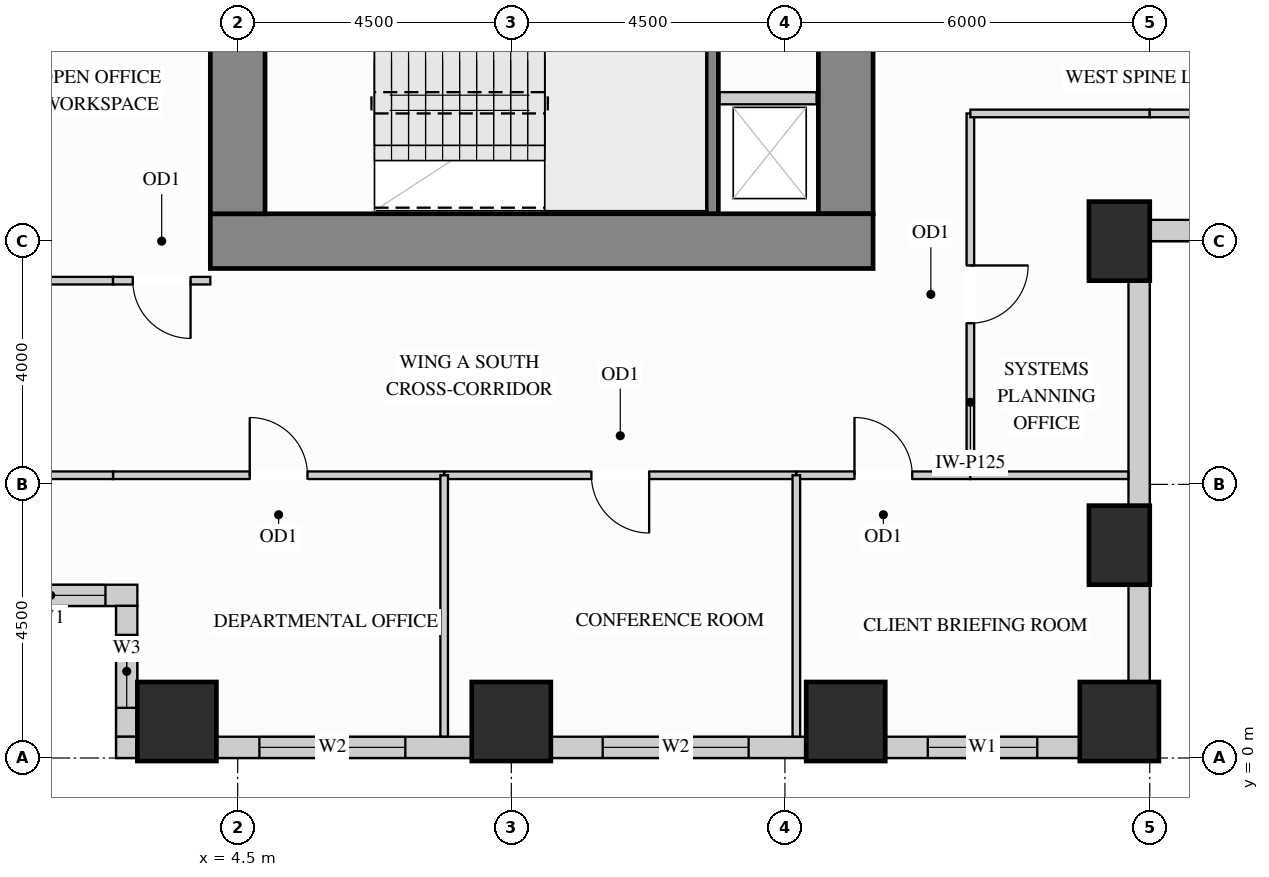
"""IFC4 building model, lengths in metres.
Left out: names, types, materials, properties, quantities, classifications, styles, units other than length and angle.
Written with IfcOpenShell. Run it as: python <this file> out.ifc"""

import sys

from ifc_helpers import new_model, si_unit, direction, frame, frame_2d, origin, origin_2d, place, context, subcontext, project, spatial, rectangle, extrude, source, transform, mapped, element, fill, save


model = new_model("IFC4")
c1 = context("Model", 3, precision=1e-05, world=origin(), true_north=direction((0.0, 1.0)))
c2 = subcontext(c1, "Body", "Model", "MODEL_VIEW")
j1 = project(units=[si_unit("LENGTHUNIT", "METRE"), si_unit("PLANEANGLEUNIT", "RADIAN")], contexts=[c1])
p1 = place(None, origin())
s1 = spatial("IfcSite", under=j1, at=p1, CompositionType="ELEMENT")
p2 = place(p1, origin())
s2 = spatial("IfcBuilding", under=s1, at=p2, CompositionType="ELEMENT")
p3 = place(p2, frame((0.0, 0.0, 22.5)))
s3 = spatial("IfcBuildingStorey", under=s2, at=p3, CompositionType="ELEMENT", Elevation=22.5)
m1 = source(origin(), c2, "Body", "SweptSolid", [
    extrude(rectangle(XDim=1.0, YDim=1.3, at=origin_2d()), origin(), (0.0, 0.0, 1.0), 3.38),
])
for number, where, z_axis, x_axis in (
    (1, (19.0, 3.5, 0.0), (0.0, 0.0, 1.0), (1.0, 0.0, 0.0)),
    (2, (19.0, 8.5, 0.0), (0.0, 0.0, 1.0), (1.0, 0.0, 0.0)),
):
    element("IfcColumn", number, at=place(p3, frame(where, z_axis=z_axis, x_axis=x_axis)), inside=s3, PredefinedType="COLUMN", context=c2, shape_type="MappedRepresentation", body=[
        mapped(m1, transform((0.0, 0.0, 0.0), x_axis=(1.0, 0.0, 0.0), y_axis=(0.0, 1.0, 0.0), z_axis=(0.0, 0.0, 1.0))),
    ])
m2 = source(origin(), c2, "Body", "SweptSolid", [
    extrude(rectangle(XDim=1.3, YDim=1.3, at=origin_2d()), origin(), (0.0, 0.0, 1.0), 3.38),
])
for number, where, z_axis, x_axis in (
    (3, (14.5, 0.6, 0.0), (0.0, 0.0, 1.0), (1.0, 0.0, 0.0)),
    (4, (19.0, 0.6, 0.0), (0.0, 0.0, 1.0), (1.0, 0.0, 0.0)),
    (5, (3.5, 0.6, 0.0), (0.0, 0.0, 1.0), (1.0, 0.0, 0.0)),
    (6, (9.0, 0.6, 0.0), (0.0, 0.0, 1.0), (1.0, 0.0, 0.0)),
):
    element("IfcColumn", number, at=place(p3, frame(where, z_axis=z_axis, x_axis=x_axis)), inside=s3, PredefinedType="COLUMN", context=c2, shape_type="MappedRepresentation", body=[
        mapped(m2, transform((0.0, 0.0, 0.0), x_axis=(1.0, 0.0, 0.0), y_axis=(0.0, 1.0, 0.0), z_axis=(0.0, 0.0, 1.0))),
    ])
m3 = source(origin(), c2, "Body", "SweptSolid", [
    extrude(rectangle(XDim=9.87, YDim=0.9, at=frame_2d((4.935, 0.0))), origin(), (0.0, 0.0, 1.0), 3.38),
])
p4 = place(p3, frame((14.5, 8.95, 0.0), z_axis=(0.0, 0.0, 1.0), x_axis=(0.0, 1.0, 0.0)))
e7 = element("IfcWall", 7, at=p4, inside=s3, PredefinedType="SHEAR", context=c2, shape_type="MappedRepresentation", body=[
    mapped(m3, transform((0.0, 0.0, 0.0), x_axis=(1.0, 0.0, 0.0), y_axis=(0.0, 1.0, 0.0), z_axis=(0.0, 0.0, 1.0))),
])
m4 = source(origin(), c2, "Body", "SweptSolid", [
    extrude(rectangle(XDim=10.9, YDim=0.9, at=frame_2d((5.45, 0.0))), origin(), (0.0, 0.0, 1.0), 3.38),
])
p5 = place(p3, frame((4.05, 8.5, 0.0), z_axis=(0.0, 0.0, 1.0), x_axis=(1.0, 0.0, 0.0)))
e8 = element("IfcWall", 8, at=p5, inside=s3, PredefinedType="SHEAR", context=c2, shape_type="MappedRepresentation", body=[
    mapped(m4, transform((0.0, 0.0, 0.0), x_axis=(1.0, 0.0, 0.0), y_axis=(0.0, 1.0, 0.0), z_axis=(0.0, 0.0, 1.0))),
])
m5 = source(origin(), c2, "Body", "SweptSolid", [
    extrude(rectangle(XDim=20.1, YDim=0.9, at=frame_2d((10.05, 0.0))), origin(), (0.0, 0.0, 1.0), 3.38),
])
p6 = place(p3, frame((4.5, 8.95, 0.0), z_axis=(0.0, 0.0, 1.0), x_axis=(0.0, 1.0, 0.0)))
e9 = element("IfcWall", 9, at=p6, inside=s3, PredefinedType="SHEAR", context=c2, shape_type="MappedRepresentation", body=[
    mapped(m5, transform((0.0, 0.0, 0.0), x_axis=(1.0, 0.0, 0.0), y_axis=(0.0, 1.0, 0.0), z_axis=(0.0, 0.0, 1.0))),
])
p7 = place(p3, frame((0.0, 2.675, 0.0), z_axis=(0.0, 0.0, 1.0), x_axis=(1.0, 0.0, 0.0)))
e10 = element("IfcWall", 10, at=p7, inside=s3, PredefinedType="SOLIDWALL", context=c2, shape_type="SweptSolid", body=[
    extrude(rectangle(XDim=2.85, YDim=0.35, at=frame_2d((1.425, 0.0))), origin(), (0.0, 0.0, 1.0), 3.365),
])
p8 = place(p7, frame((0.525, 0.0, 0.78)))
e11 = element("IfcOpeningElement", 11, at=p8, cuts=e10, PredefinedType="OPENING", context=c2, shape_type="SweptSolid", body=[
    extrude(rectangle(XDim=1.8, YDim=2.1, at=frame_2d((0.9, 1.05))), frame((0.0, 0.185, 0.0), z_axis=(0.0, -1.0, 0.0), x_axis=(1.0, 0.0, 0.0)), (0.0, 0.0, 1.0), 0.37),
])
p9 = place(p3, frame((2.675, 2.502, 0.0), z_axis=(0.0, 0.0, 1.0), x_axis=(0.0, -1.0, 0.0)))
e12 = element("IfcWall", 12, at=p9, inside=s3, PredefinedType="SOLIDWALL", context=c2, shape_type="SweptSolid", body=[
    extrude(rectangle(XDim=2.154, YDim=0.35, at=frame_2d((1.077, 0.0))), origin(), (0.0, 0.0, 1.0), 3.365),
])
p10 = place(p9, frame((0.477, 0.0, 0.78)))
e13 = element("IfcOpeningElement", 13, at=p10, cuts=e12, PredefinedType="OPENING", context=c2, shape_type="SweptSolid", body=[
    extrude(rectangle(XDim=1.2, YDim=2.1, at=frame_2d((0.6, 1.05))), frame((0.0, 0.185, 0.0), z_axis=(0.0, -1.0, 0.0), x_axis=(1.0, 0.0, 0.0)), (0.0, 0.0, 1.0), 0.37),
])
m6 = source(origin(), c2, "Body", "SweptSolid", [
    extrude(rectangle(XDim=0.352, YDim=0.35, at=frame_2d((0.176, 0.0))), origin(), (0.0, 0.0, 1.0), 3.365),
])
p11 = place(p3, frame((2.5, 0.175, 0.0), z_axis=(0.0, 0.0, 1.0), x_axis=(1.0, 0.0, 0.0)))
e14 = element("IfcWall", 14, at=p11, inside=s3, PredefinedType="SOLIDWALL", context=c2, shape_type="MappedRepresentation", body=[
    mapped(m6, transform((0.0, 0.0, 0.0), x_axis=(1.0, 0.0, 0.0), y_axis=(0.0, 1.0, 0.0), z_axis=(0.0, 0.0, 1.0))),
])
p12 = place(p3, frame((4.148, 0.175, 0.0), z_axis=(0.0, 0.0, 1.0), x_axis=(1.0, 0.0, 0.0)))
e15 = element("IfcWall", 15, at=p12, inside=s3, PredefinedType="SOLIDWALL", context=c2, shape_type="SweptSolid", body=[
    extrude(rectangle(XDim=4.204, YDim=0.35, at=frame_2d((2.102, 0.0))), origin(), (0.0, 0.0, 1.0), 2.51),
])
p13 = place(p12, frame((0.709, 0.0, 0.78)))
e16 = element("IfcOpeningElement", 16, at=p13, cuts=e15, PredefinedType="OPENING", context=c2, shape_type="SweptSolid", body=[
    extrude(rectangle(XDim=2.4, YDim=1.55, at=frame_2d((1.2, 0.775))), frame((0.0, 0.185, 0.0), z_axis=(0.0, -1.0, 0.0), x_axis=(1.0, 0.0, 0.0)), (0.0, 0.0, 1.0), 0.37),
])
p14 = place(p3, frame((9.648, 0.175, 0.0), z_axis=(0.0, 0.0, 1.0), x_axis=(1.0, 0.0, 0.0)))
e17 = element("IfcWall", 17, at=p14, inside=s3, PredefinedType="SOLIDWALL", context=c2, shape_type="SweptSolid", body=[
    extrude(rectangle(XDim=4.204, YDim=0.35, at=frame_2d((2.102, 0.0))), origin(), (0.0, 0.0, 1.0), 2.51),
])
p15 = place(p14, frame((0.855, 0.0, 0.78)))
e18 = element("IfcOpeningElement", 18, at=p15, cuts=e17, PredefinedType="OPENING", context=c2, shape_type="SweptSolid", body=[
    extrude(rectangle(XDim=2.4, YDim=1.55, at=frame_2d((1.2, 0.775))), frame((0.0, 0.185, 0.0), z_axis=(0.0, -1.0, 0.0), x_axis=(1.0, 0.0, 0.0)), (0.0, 0.0, 1.0), 0.37),
])
p16 = place(p3, frame((15.148, 0.175, 0.0), z_axis=(0.0, 0.0, 1.0), x_axis=(1.0, 0.0, 0.0)))
e19 = element("IfcWall", 19, at=p16, inside=s3, PredefinedType="SOLIDWALL", context=c2, shape_type="SweptSolid", body=[
    extrude(rectangle(XDim=3.204, YDim=0.35, at=frame_2d((1.602, 0.0))), origin(), (0.0, 0.0, 1.0), 2.51),
])
p17 = place(p16, frame((0.702, 0.0, 0.78)))
e20 = element("IfcOpeningElement", 20, at=p17, cuts=e19, PredefinedType="OPENING", context=c2, shape_type="SweptSolid", body=[
    extrude(rectangle(XDim=1.8, YDim=1.55, at=frame_2d((0.9, 0.775))), frame((0.0, 0.185, 0.0), z_axis=(0.0, -1.0, 0.0), x_axis=(1.0, 0.0, 0.0)), (0.0, 0.0, 1.0), 0.37),
])
m7 = source(origin(), c2, "Body", "SweptSolid", [
    extrude(rectangle(XDim=1.604, YDim=0.35, at=frame_2d((0.802, 0.0))), origin(), (0.0, 0.0, 1.0), 2.51),
])
p18 = place(p3, frame((19.325, 1.248, 0.0), z_axis=(0.0, 0.0, 1.0), x_axis=(0.0, 1.0, 0.0)))
e21 = element("IfcWall", 21, at=p18, inside=s3, PredefinedType="SOLIDWALL", context=c2, shape_type="MappedRepresentation", body=[
    mapped(m7, transform((0.0, 0.0, 0.0), x_axis=(1.0, 0.0, 0.0), y_axis=(0.0, 1.0, 0.0), z_axis=(0.0, 0.0, 1.0))),
])
m8 = source(origin(), c2, "Body", "SweptSolid", [
    extrude(rectangle(XDim=3.704, YDim=0.35, at=frame_2d((1.852, 0.0))), origin(), (0.0, 0.0, 1.0), 2.51),
])
p19 = place(p3, frame((19.325, 4.148, 0.0), z_axis=(0.0, 0.0, 1.0), x_axis=(0.0, 1.0, 0.0)))
e22 = element("IfcWall", 22, at=p19, inside=s3, PredefinedType="SOLIDWALL", context=c2, shape_type="MappedRepresentation", body=[
    mapped(m8, transform((0.0, 0.0, 0.0), x_axis=(1.0, 0.0, 0.0), y_axis=(0.0, 1.0, 0.0), z_axis=(0.0, 0.0, 1.0))),
])
p20 = place(p3, frame((19.498, 8.675, 0.0), z_axis=(0.0, 0.0, 1.0), x_axis=(1.0, 0.0, 0.0)))
e23 = element("IfcWall", 23, at=p20, inside=s3, PredefinedType="SOLIDWALL", context=c2, shape_type="SweptSolid", body=[
    extrude(rectangle(XDim=3.404, YDim=0.35, at=frame_2d((1.702, 0.0))), origin(), (0.0, 0.0, 1.0), 3.365),
])
p21 = place(p20, frame((0.952, 0.0, 0.78)))
e24 = element("IfcOpeningElement", 24, at=p21, cuts=e23, PredefinedType="OPENING", context=c2, shape_type="SweptSolid", body=[
    extrude(rectangle(XDim=1.5, YDim=2.0, at=frame_2d((0.75, 1.0))), frame((0.0, 0.185, 0.0), z_axis=(0.0, -1.0, 0.0), x_axis=(1.0, 0.0, 0.0)), (0.0, 0.0, 1.0), 0.37),
])
p22 = place(p3, frame((16.55, 4.65, 0.0), z_axis=(0.0, 0.0, 1.0), x_axis=(0.0, 1.0, 0.0)))
e25 = element("IfcWall", 25, at=p22, inside=s3, PredefinedType="PARTITIONING", context=c2, shape_type="SweptSolid", body=[
    extrude(rectangle(XDim=5.95, YDim=0.125, at=frame_2d((2.975, 0.0))), origin(), (0.0, 0.0, 1.0), 3.365),
])
p23 = place(p22, frame((2.5, 0.0, 0.0)))
e26 = element("IfcOpeningElement", 26, at=p23, cuts=e25, PredefinedType="OPENING", context=c2, shape_type="SweptSolid", body=[
    extrude(rectangle(XDim=0.95, YDim=2.15, at=frame_2d((0.475, 1.075))), frame((0.0, 0.073, 0.0), z_axis=(0.0, -1.0, 0.0), x_axis=(1.0, 0.0, 0.0)), (0.0, 0.0, 1.0), 0.145),
])
m9 = source(origin(), c2, "Body", "SweptSolid", [
    extrude(rectangle(XDim=1.19, YDim=0.125, at=frame_2d((0.595, 0.0))), origin(), (0.0, 0.0, 1.0), 3.365),
])
p24 = place(p3, frame((1.26, 7.85, 0.0), z_axis=(0.0, 0.0, 1.0), x_axis=(1.0, 0.0, 0.0)))
e27 = element("IfcWall", 27, at=p24, inside=s3, PredefinedType="PARTITIONING", context=c2, shape_type="MappedRepresentation", body=[
    mapped(m9, transform((0.0, 0.0, 0.0), x_axis=(1.0, 0.0, 0.0), y_axis=(0.0, 1.0, 0.0), z_axis=(0.0, 0.0, 1.0))),
])
p25 = place(p3, frame((2.45, 7.85, 0.0), z_axis=(0.0, 0.0, 1.0), x_axis=(1.0, 0.0, 0.0)))
e28 = element("IfcWall", 28, at=p25, inside=s3, PredefinedType="PARTITIONING", context=c2, shape_type="SweptSolid", body=[
    extrude(rectangle(XDim=1.6, YDim=0.125, at=frame_2d((0.8, 0.0))), origin(), (0.0, 0.0, 1.0), 3.365),
])
p26 = place(p25, frame((0.325, 0.0, 0.0)))
e29 = element("IfcOpeningElement", 29, at=p26, cuts=e28, PredefinedType="OPENING", context=c2, shape_type="SweptSolid", body=[
    extrude(rectangle(XDim=0.95, YDim=2.15, at=frame_2d((0.475, 1.075))), frame((0.0, 0.073, 0.0), z_axis=(0.0, -1.0, 0.0), x_axis=(1.0, 0.0, 0.0)), (0.0, 0.0, 1.0), 0.145),
])
m10 = source(origin(), c2, "Body", "SweptSolid", [
    extrude(rectangle(XDim=2.95, YDim=0.125, at=frame_2d((1.475, 0.0))), origin(), (0.0, 0.0, 1.0), 3.365),
])
p27 = place(p3, frame((16.55, 10.6, 0.0), z_axis=(0.0, 0.0, 1.0), x_axis=(1.0, 0.0, 0.0)))
e30 = element("IfcWall", 30, at=p27, inside=s3, PredefinedType="PARTITIONING", context=c2, shape_type="MappedRepresentation", body=[
    mapped(m10, transform((0.0, 0.0, 0.0), x_axis=(1.0, 0.0, 0.0), y_axis=(0.0, 1.0, 0.0), z_axis=(0.0, 0.0, 1.0))),
])
p28 = place(p3, frame((19.5, 10.6, 0.0), z_axis=(0.0, 0.0, 1.0), x_axis=(1.0, 0.0, 0.0)))
e31 = element("IfcWall", 31, at=p28, inside=s3, PredefinedType="PARTITIONING", context=c2, shape_type="SweptSolid", body=[
    extrude(rectangle(XDim=14.9, YDim=0.125, at=frame_2d((7.45, 0.0))), origin(), (0.0, 0.0, 1.0), 3.365),
])
p29 = place(p28, frame((6.975, 0.0, 0.0)))
e32 = element("IfcOpeningElement", 32, at=p29, cuts=e31, PredefinedType="OPENING", context=c2, shape_type="SweptSolid", body=[
    extrude(rectangle(XDim=0.95, YDim=2.15, at=frame_2d((0.475, 1.075))), frame((0.0, 0.073, 0.0), z_axis=(0.0, -1.0, 0.0), x_axis=(1.0, 0.0, 0.0)), (0.0, 0.0, 1.0), 0.145),
])
p30 = place(p3, frame((2.45, 4.65, 0.0), z_axis=(0.0, 0.0, 1.0), x_axis=(1.0, 0.0, 0.0)))
e33 = element("IfcWall", 33, at=p30, inside=s3, PredefinedType="PARTITIONING", context=c2, shape_type="SweptSolid", body=[
    extrude(rectangle(XDim=5.446, YDim=0.125, at=frame_2d((2.723, 0.0))), origin(), (0.0, 0.0, 1.0), 2.828),
])
p31 = place(p30, frame((2.248, 0.0, 0.0)))
e34 = element("IfcOpeningElement", 34, at=p31, cuts=e33, PredefinedType="OPENING", context=c2, shape_type="SweptSolid", body=[
    extrude(rectangle(XDim=0.95, YDim=2.15, at=frame_2d((0.475, 1.075))), frame((0.0, 0.073, 0.0), z_axis=(0.0, -1.0, 0.0), x_axis=(1.0, 0.0, 0.0)), (0.0, 0.0, 1.0), 0.145),
])
p32 = place(p3, frame((7.896, 4.65, 0.0), z_axis=(0.0, 0.0, 1.0), x_axis=(1.0, 0.0, 0.0)))
e35 = element("IfcWall", 35, at=p32, inside=s3, PredefinedType="PARTITIONING", context=c2, shape_type="SweptSolid", body=[
    extrude(rectangle(XDim=5.792, YDim=0.125, at=frame_2d((2.896, 0.0))), origin(), (0.0, 0.0, 1.0), 2.828),
])
p33 = place(p32, frame((2.421, 0.0, 0.0)))
e36 = element("IfcOpeningElement", 36, at=p33, cuts=e35, PredefinedType="OPENING", context=c2, shape_type="SweptSolid", body=[
    extrude(rectangle(XDim=0.95, YDim=2.15, at=frame_2d((0.475, 1.075))), frame((0.0, 0.073, 0.0), z_axis=(0.0, -1.0, 0.0), x_axis=(1.0, 0.0, 0.0)), (0.0, 0.0, 1.0), 0.145),
])
p34 = place(p3, frame((13.688, 4.65, 0.0), z_axis=(0.0, 0.0, 1.0), x_axis=(1.0, 0.0, 0.0)))
e37 = element("IfcWall", 37, at=p34, inside=s3, PredefinedType="PARTITIONING", context=c2, shape_type="SweptSolid", body=[
    extrude(rectangle(XDim=2.862, YDim=0.125, at=frame_2d((1.431, 0.0))), origin(), (0.0, 0.0, 1.0), 2.828),
])
p35 = place(p34, frame((0.956, 0.0, 0.0)))
e38 = element("IfcOpeningElement", 38, at=p35, cuts=e37, PredefinedType="OPENING", context=c2, shape_type="SweptSolid", body=[
    extrude(rectangle(XDim=0.95, YDim=2.15, at=frame_2d((0.475, 1.075))), frame((0.0, 0.073, 0.0), z_axis=(0.0, -1.0, 0.0), x_axis=(1.0, 0.0, 0.0)), (0.0, 0.0, 1.0), 0.145),
])
m11 = source(origin(), c2, "Body", "SweptSolid", [
    extrude(rectangle(XDim=2.098, YDim=0.125, at=frame_2d((1.049, 0.0))), origin(), (0.0, 0.0, 1.0), 2.828),
])
p36 = place(p3, frame((0.352, 4.65, 0.0), z_axis=(0.0, 0.0, 1.0), x_axis=(1.0, 0.0, 0.0)))
e39 = element("IfcWall", 39, at=p36, inside=s3, PredefinedType="PARTITIONING", context=c2, shape_type="MappedRepresentation", body=[
    mapped(m11, transform((0.0, 0.0, 0.0), x_axis=(1.0, 0.0, 0.0), y_axis=(0.0, 1.0, 0.0), z_axis=(0.0, 0.0, 1.0))),
])
m12 = source(origin(), c2, "Body", "SweptSolid", [
    extrude(rectangle(XDim=2.598, YDim=0.125, at=frame_2d((1.299, 0.0))), origin(), (0.0, 0.0, 1.0), 2.828),
])
p37 = place(p3, frame((16.55, 4.65, 0.0), z_axis=(0.0, 0.0, 1.0), x_axis=(1.0, 0.0, 0.0)))
e40 = element("IfcWall", 40, at=p37, inside=s3, PredefinedType="PARTITIONING", context=c2, shape_type="MappedRepresentation", body=[
    mapped(m12, transform((0.0, 0.0, 0.0), x_axis=(1.0, 0.0, 0.0), y_axis=(0.0, 1.0, 0.0), z_axis=(0.0, 0.0, 1.0))),
])
m13 = source(origin(), c2, "Body", "SweptSolid", [
    extrude(rectangle(XDim=4.298, YDim=0.125, at=frame_2d((2.149, 0.0))), origin(), (0.0, 0.0, 1.0), 3.365),
])
for number, where, z_axis, x_axis in (
    (41, (7.896, 0.352, 0.0), (0.0, 0.0, 1.0), (0.0, 1.0, 0.0)),
    (42, (13.688, 0.352, 0.0), (0.0, 0.0, 1.0), (0.0, 1.0, 0.0)),
):
    element("IfcWall", number, at=place(p3, frame(where, z_axis=z_axis, x_axis=x_axis)), inside=s3, PredefinedType="PARTITIONING", context=c2, shape_type="MappedRepresentation", body=[
        mapped(m13, transform((0.0, 0.0, 0.0), x_axis=(1.0, 0.0, 0.0), y_axis=(0.0, 1.0, 0.0), z_axis=(0.0, 0.0, 1.0))),
    ])
m14 = source(origin(), c2, "Body", "SweptSolid", [
    extrude(rectangle(XDim=1.6, YDim=0.2, at=frame_2d((0.8, 0.0))), origin(), (0.0, 0.0, 1.0), 3.365),
])
p38 = place(p3, frame((12.42, 10.85, 0.0), z_axis=(0.0, 0.0, 1.0), x_axis=(1.0, 0.0, 0.0)))
e43 = element("IfcWall", 43, at=p38, inside=s3, PredefinedType="PARTITIONING", context=c2, shape_type="MappedRepresentation", body=[
    mapped(m14, transform((0.0, 0.0, 0.0), x_axis=(1.0, 0.0, 0.0), y_axis=(0.0, 1.0, 0.0), z_axis=(0.0, 0.0, 1.0))),
])
m15 = source(origin(), c2, "Body", "SweptSolid", [
    extrude(rectangle(XDim=3.603, YDim=0.2, at=frame_2d((1.802, 0.0))), origin(), (0.0, 0.0, 1.0), 3.38),
])
p39 = place(p3, frame((12.305, 8.952, 0.0), z_axis=(0.0, 0.0, 1.0), x_axis=(0.0, 1.0, 0.0)))
e44 = element("IfcWall", 44, at=p39, inside=s3, PredefinedType="SHEAR", context=c2, shape_type="MappedRepresentation", body=[
    mapped(m15, transform((0.0, 0.0, 0.0), x_axis=(1.0, 0.0, 0.0), y_axis=(0.0, 1.0, 0.0), z_axis=(0.0, 0.0, 1.0))),
])
m16 = source(origin(), c2, "Body", "SweptSolid", [
    extrude(rectangle(XDim=0.95, YDim=2.15, at=frame_2d((0.475, 1.075))), frame((0.0, 0.025, 0.0), z_axis=(0.0, -1.0, 0.0), x_axis=(1.0, 0.0, 0.0)), (0.0, 0.0, 1.0), 0.05),
])
p40 = place(p23, origin())
e45 = element("IfcDoor", 45, at=p40, inside=s3, OperationType="SINGLE_SWING_RIGHT", PredefinedType="DOOR", context=c2, shape_type="MappedRepresentation", body=[
    mapped(m16, transform((0.0, 0.0, 0.0), x_axis=(1.0, 0.0, 0.0), y_axis=(0.0, 1.0, 0.0), z_axis=(0.0, 0.0, 1.0))),
])
fill(e26, e45)
p41 = place(p31, origin())
e46 = element("IfcDoor", 46, at=p41, inside=s3, OperationType="SINGLE_SWING_LEFT", PredefinedType="DOOR", context=c2, shape_type="MappedRepresentation", body=[
    mapped(m16, transform((0.0, 0.0, 0.0), x_axis=(1.0, 0.0, 0.0), y_axis=(0.0, 1.0, 0.0), z_axis=(0.0, 0.0, 1.0))),
])
fill(e34, e46)
p42 = place(p33, origin())
e47 = element("IfcDoor", 47, at=p42, inside=s3, OperationType="SINGLE_SWING_RIGHT", PredefinedType="DOOR", context=c2, shape_type="MappedRepresentation", body=[
    mapped(m16, transform((0.0, 0.0, 0.0), x_axis=(1.0, 0.0, 0.0), y_axis=(0.0, 1.0, 0.0), z_axis=(0.0, 0.0, 1.0))),
])
fill(e36, e47)
p43 = place(p35, origin())
e48 = element("IfcDoor", 48, at=p43, inside=s3, OperationType="SINGLE_SWING_LEFT", PredefinedType="DOOR", context=c2, shape_type="MappedRepresentation", body=[
    mapped(m16, transform((0.0, 0.0, 0.0), x_axis=(1.0, 0.0, 0.0), y_axis=(0.0, 1.0, 0.0), z_axis=(0.0, 0.0, 1.0))),
])
fill(e38, e48)
p44 = place(p26, origin())
e49 = element("IfcDoor", 49, at=p44, inside=s3, OperationType="SINGLE_SWING_RIGHT", PredefinedType="DOOR", context=c2, shape_type="MappedRepresentation", body=[
    mapped(m16, transform((0.0, 0.0, 0.0), x_axis=(1.0, 0.0, 0.0), y_axis=(0.0, 1.0, 0.0), z_axis=(0.0, 0.0, 1.0))),
])
fill(e29, e49)
m17 = source(origin(), c2, "Body", "SweptSolid", [
    extrude(rectangle(XDim=1.8, YDim=2.1, at=frame_2d((0.9, 1.05))), frame((0.0, 0.03, 0.0), z_axis=(0.0, -1.0, 0.0), x_axis=(1.0, 0.0, 0.0)), (0.0, 0.0, 1.0), 0.06),
])
p45 = place(p8, origin())
e50 = element("IfcWindow", 50, at=p45, inside=s3, PartitioningType="SINGLE_PANEL", PredefinedType="WINDOW", context=c2, shape_type="MappedRepresentation", body=[
    mapped(m17, transform((0.0, 0.0, 0.0), x_axis=(1.0, 0.0, 0.0), y_axis=(0.0, 1.0, 0.0), z_axis=(0.0, 0.0, 1.0))),
])
fill(e11, e50)
m18 = source(origin(), c2, "Body", "SweptSolid", [
    extrude(rectangle(XDim=1.8, YDim=1.55, at=frame_2d((0.9, 0.775))), frame((0.0, 0.03, 0.0), z_axis=(0.0, -1.0, 0.0), x_axis=(1.0, 0.0, 0.0)), (0.0, 0.0, 1.0), 0.06),
])
p46 = place(p17, origin())
e51 = element("IfcWindow", 51, at=p46, inside=s3, PartitioningType="SINGLE_PANEL", PredefinedType="WINDOW", context=c2, shape_type="MappedRepresentation", body=[
    mapped(m18, transform((0.0, 0.0, 0.0), x_axis=(1.0, 0.0, 0.0), y_axis=(0.0, 1.0, 0.0), z_axis=(0.0, 0.0, 1.0))),
])
fill(e20, e51)
m19 = source(origin(), c2, "Body", "SweptSolid", [
    extrude(rectangle(XDim=2.4, YDim=1.55, at=frame_2d((1.2, 0.775))), frame((0.0, 0.03, 0.0), z_axis=(0.0, -1.0, 0.0), x_axis=(1.0, 0.0, 0.0)), (0.0, 0.0, 1.0), 0.06),
])
p47 = place(p13, origin())
e52 = element("IfcWindow", 52, at=p47, inside=s3, PartitioningType="SINGLE_PANEL", PredefinedType="WINDOW", context=c2, shape_type="MappedRepresentation", body=[
    mapped(m19, transform((0.0, 0.0, 0.0), x_axis=(1.0, 0.0, 0.0), y_axis=(0.0, 1.0, 0.0), z_axis=(0.0, 0.0, 1.0))),
])
fill(e16, e52)
p48 = place(p15, origin())
e53 = element("IfcWindow", 53, at=p48, inside=s3, PartitioningType="SINGLE_PANEL", PredefinedType="WINDOW", context=c2, shape_type="MappedRepresentation", body=[
    mapped(m19, transform((0.0, 0.0, 0.0), x_axis=(1.0, 0.0, 0.0), y_axis=(0.0, 1.0, 0.0), z_axis=(0.0, 0.0, 1.0))),
])
fill(e18, e53)
m20 = source(origin(), c2, "Body", "SweptSolid", [
    extrude(rectangle(XDim=1.2, YDim=2.1, at=frame_2d((0.6, 1.05))), frame((0.0, 0.03, 0.0), z_axis=(0.0, -1.0, 0.0), x_axis=(1.0, 0.0, 0.0)), (0.0, 0.0, 1.0), 0.06),
])
p49 = place(p10, origin())
e54 = element("IfcWindow", 54, at=p49, inside=s3, PartitioningType="SINGLE_PANEL", PredefinedType="WINDOW", context=c2, shape_type="MappedRepresentation", body=[
    mapped(m20, transform((0.0, 0.0, 0.0), x_axis=(1.0, 0.0, 0.0), y_axis=(0.0, 1.0, 0.0), z_axis=(0.0, 0.0, 1.0))),
])
fill(e13, e54)
save(model, sys.argv[1])
